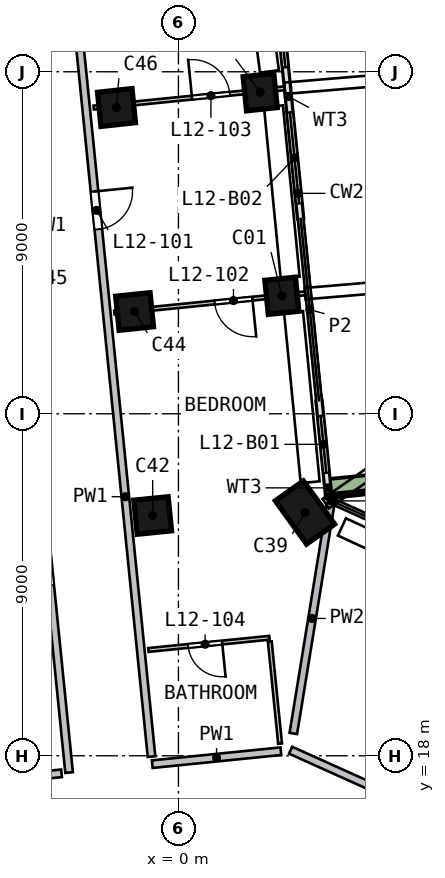
"""IFC4 building model, lengths in metres.
Left out: names, types, materials, properties, quantities, classifications, styles, units other than length and angle.
Written with IfcOpenShell. Run it as: python <this file> out.ifc"""

import sys

from ifc_helpers import new_model, si_unit, direction, frame, frame_2d, origin, origin_2d, place, context, subcontext, project, spatial, rectangle, extrude, element, fill, save


model = new_model("IFC4")
c1 = context("Model", 3, precision=1e-05, world=origin(), true_north=direction((0.0, 1.0)))
c2 = subcontext(c1, "Body", "Model", "MODEL_VIEW")
j1 = project(units=[si_unit("LENGTHUNIT", "METRE"), si_unit("PLANEANGLEUNIT", "RADIAN")], contexts=[c1])
p1 = place(None, origin())
s1 = spatial("IfcSite", under=j1, at=p1, CompositionType="ELEMENT")
p2 = place(p1, origin())
s2 = spatial("IfcBuilding", under=s1, at=p2, CompositionType="ELEMENT")
p3 = place(p2, frame((0.0, 0.0, 56.5)))
s3 = spatial("IfcBuildingStorey", under=s2, at=p3, CompositionType="ELEMENT", Elevation=56.5)
p4 = place(p3, frame((2.891, 30.124, 0.0), z_axis=(-0.139578196, -0.016064374, 0.990080736), x_axis=(-0.100870141, 0.994897743, 0.001922204)))
e1 = element("IfcColumn", 1, at=p4, inside=s3, PredefinedType="COLUMN", context=c2, shape_type="SweptSolid", body=[
    extrude(rectangle(XDim=0.9, YDim=0.8, at=origin_2d()), origin(), (0.0, 0.0, 1.0), 3.222),
])
p5 = place(p3, frame((2.347, 35.521, 0.0), z_axis=(-0.161009638, -0.047156056, 0.985825645), x_axis=(-0.105437121, 0.993963489, 0.03032484)))
e2 = element("IfcColumn", 2, at=p5, inside=s3, PredefinedType="COLUMN", context=c2, shape_type="SweptSolid", body=[
    extrude(rectangle(XDim=0.9, YDim=0.8, at=origin_2d()), origin(), (0.0, 0.0, 1.0), 3.236),
])
p6 = place(p3, frame((3.47, 24.383, 0.0), z_axis=(-0.116064233, 0.015505634, 0.993120672), x_axis=(0.577080719, -0.812746414, 0.080131833)))
e3 = element("IfcColumn", 3, at=p6, inside=s3, PredefinedType="COLUMN", context=c2, shape_type="SweptSolid", body=[
    extrude(rectangle(XDim=1.4, YDim=0.9, at=origin_2d()), origin(), (0.0, 0.0, 1.0), 3.212),
])
p7 = place(p3, frame((-0.538, 24.327, 0.0), z_axis=(-0.115627488, -0.003496952, 0.993286492), x_axis=(-0.099182883, 0.995036719, -0.008042666)))
e4 = element("IfcColumn", 4, at=p7, inside=s3, PredefinedType="COLUMN", context=c2, shape_type="SweptSolid", body=[
    extrude(rectangle(XDim=0.9, YDim=0.9, at=origin_2d()), origin(), (0.0, 0.0, 1.0), 3.211),
])
p8 = place(p3, frame((-0.987, 29.733, 0.0), z_axis=(-0.137507975, -0.034320172, 0.989905896), x_axis=(-0.102729911, 0.99450397, 0.020209361)))
e5 = element("IfcColumn", 5, at=p8, inside=s3, PredefinedType="COLUMN", context=c2, shape_type="SweptSolid", body=[
    extrude(rectangle(XDim=0.9, YDim=0.9, at=origin_2d()), origin(), (0.0, 0.0, 1.0), 3.222),
])
p9 = place(p3, frame((-1.436, 35.139, 0.0), z_axis=(-0.158938447, -0.064992857, 0.985146943), x_axis=(-0.108561038, 0.992930661, 0.047991701)))
e6 = element("IfcColumn", 6, at=p9, inside=s3, PredefinedType="COLUMN", context=c2, shape_type="SweptSolid", body=[
    extrude(rectangle(XDim=0.9, YDim=0.9, at=origin_2d()), origin(), (0.0, 0.0, 1.0), 3.238),
])
p10 = place(p3, frame((3.951, 24.85, 0.0), z_axis=(0.0, 0.0, 1.0), x_axis=(-0.100315267, 0.994955701, 0.0)))
e7 = element("IfcWall", 7, at=p10, inside=s3, PredefinedType="SOLIDWALL", context=c2, shape_type="SweptSolid", body=[
    extrude(rectangle(XDim=2.502, YDim=0.15, at=frame_2d((1.251, 0.0))), origin(), (0.0, 0.0, 1.0), 2.425),
])
p11 = place(p10, frame((0.602, 0.0, 0.0)))
e8 = element("IfcOpeningElement", 8, at=p11, cuts=e7, PredefinedType="OPENING", context=c2, shape_type="SweptSolid", body=[
    extrude(rectangle(XDim=1.5, YDim=2.4, at=frame_2d((0.75, 1.2))), frame((0.0, 0.085, 0.0), z_axis=(0.0, -1.0, 0.0), x_axis=(1.0, 0.0, 0.0)), (0.0, 0.0, 1.0), 0.17),
])
p12 = place(p3, frame((3.216, 32.141, 0.0), z_axis=(0.0, 0.0, 1.0), x_axis=(-0.100358585, 0.994951333, 0.0)))
e9 = element("IfcWall", 9, at=p12, inside=s3, PredefinedType="SOLIDWALL", context=c2, shape_type="SweptSolid", body=[
    extrude(rectangle(XDim=3.449, YDim=0.15, at=frame_2d((1.725, 0.0))), origin(), (0.0, 0.0, 1.0), 2.425),
])
p13 = place(p12, frame((0.4, 0.0, 0.0)))
e10 = element("IfcOpeningElement", 10, at=p13, cuts=e9, PredefinedType="OPENING", context=c2, shape_type="SweptSolid", body=[
    extrude(rectangle(XDim=2.4, YDim=2.4, at=frame_2d((1.2, 1.2))), frame((0.0, 0.085, 0.0), z_axis=(0.0, -1.0, 0.0), x_axis=(1.0, 0.0, 0.0)), (0.0, 0.0, 1.0), 0.17),
])
p14 = place(p3, frame((2.869, 35.573, 0.0), z_axis=(0.0, 0.0, 1.0), x_axis=(-0.100352227, 0.994951974, 0.0)))
e11 = element("IfcWall", 11, at=p14, inside=s3, PredefinedType="SOLIDWALL", context=c2, shape_type="SweptSolid", body=[
    extrude(rectangle(XDim=2.45, YDim=0.15, at=frame_2d((1.225, 0.0))), origin(), (0.0, 0.0, 1.0), 2.425),
])
p15 = place(p14, frame((0.55, 0.0, 0.0)))
e12 = element("IfcOpeningElement", 12, at=p15, cuts=e11, PredefinedType="OPENING", context=c2, shape_type="SweptSolid", body=[
    extrude(rectangle(XDim=1.5, YDim=2.4, at=frame_2d((0.75, 1.2))), frame((0.0, 0.085, 0.0), z_axis=(0.0, -1.0, 0.0), x_axis=(1.0, 0.0, 0.0)), (0.0, 0.0, 1.0), 0.17),
])
p16 = place(p3, frame((4.009, 25.037, 0.0), z_axis=(0.0, 0.0, 1.0), x_axis=(0.994951439, 0.100357532, 0.0)))
e13 = element("IfcWall", 13, at=p16, inside=s3, PredefinedType="SOLIDWALL", context=c2, shape_type="SweptSolid", body=[
    extrude(rectangle(XDim=3.199, YDim=0.5, at=frame_2d((1.6, 0.0))), origin(), (0.0, 0.0, 1.0), 0.7),
])
p17 = place(p3, frame((-3.076, 17.538, 0.0), z_axis=(0.0, 0.0, 1.0), x_axis=(-0.994955781, -0.100314472, 0.0)))
e14 = element("IfcWall", 14, at=p17, inside=s3, PredefinedType="SOLIDWALL", context=c2, shape_type="SweptSolid", body=[
    extrude(rectangle(XDim=3.458, YDim=0.2, at=frame_2d((1.729, 0.0))), origin(), (0.0, 0.0, 1.0), 3.19),
])
p18 = place(p3, frame((-2.877, 17.558, 0.0), z_axis=(0.0, 0.0, 1.0), x_axis=(-0.100365662, 0.994950619, 0.0)))
e15 = element("IfcWall", 15, at=p18, inside=s3, PredefinedType="SOLIDWALL", context=c2, shape_type="SweptSolid", body=[
    extrude(rectangle(XDim=22.771, YDim=0.2, at=frame_2d((11.385, 0.0))), origin(), (0.0, 0.0, 1.0), 3.19),
])
p19 = place(p18, frame((4.95, 0.0, 0.0)))
e16 = element("IfcOpeningElement", 16, at=p19, cuts=e15, PredefinedType="OPENING", context=c2, shape_type="SweptSolid", body=[
    extrude(rectangle(XDim=1.0, YDim=2.1, at=frame_2d((0.5, 1.05))), frame((0.0, 0.11, 0.0), z_axis=(0.0, -1.0, 0.0), x_axis=(1.0, 0.0, 0.0)), (0.0, 0.0, 1.0), 0.22),
])
p20 = place(p3, frame((-2.973, 40.435, 0.0), z_axis=(0.0, 0.0, 1.0), x_axis=(0.100357237, -0.994951469, 0.0)))
e17 = element("IfcWall", 17, at=p20, inside=s3, PredefinedType="SOLIDWALL", context=c2, shape_type="SweptSolid", body=[
    extrude(rectangle(XDim=22.571, YDim=0.2, at=frame_2d((11.285, 0.0))), origin(), (0.0, 0.0, 1.0), 3.19),
])
p21 = place(p20, frame((7.624, 0.0, 0.0)))
e18 = element("IfcOpeningElement", 18, at=p21, cuts=e17, PredefinedType="OPENING", context=c2, shape_type="SweptSolid", body=[
    extrude(rectangle(XDim=1.0, YDim=2.1, at=frame_2d((0.5, 1.05))), frame((0.0, 0.11, 0.0), z_axis=(0.0, -1.0, 0.0), x_axis=(1.0, 0.0, 0.0)), (0.0, 0.0, 1.0), 0.22),
])
p22 = place(p3, frame((2.695, 18.12, 0.0), z_axis=(0.0, 0.0, 1.0), x_axis=(-0.994948641, -0.100385263, 0.0)))
e19 = element("IfcWall", 19, at=p22, inside=s3, PredefinedType="SOLIDWALL", context=c2, shape_type="SweptSolid", body=[
    extrude(rectangle(XDim=3.4, YDim=0.2, at=frame_2d((1.7, 0.0))), origin(), (0.0, 0.0, 1.0), 3.19),
])
p23 = place(p3, frame((11.629, 14.239, 0.0), z_axis=(0.0, 0.0, 1.0), x_axis=(-0.911829794, 0.410568419, 0.0)))
e20 = element("IfcWall", 20, at=p23, inside=s3, PredefinedType="SOLIDWALL", context=c2, shape_type="SweptSolid", body=[
    extrude(rectangle(XDim=9.516, YDim=0.2, at=frame_2d((4.758, 0.0))), origin(), (0.0, 0.0, 1.0), 3.19),
])
p24 = place(p3, frame((4.009, 24.64, 0.0), z_axis=(0.0, 0.0, 1.0), x_axis=(-0.160569165, -0.987024591, 0.0)))
e21 = element("IfcWall", 21, at=p24, inside=s3, PredefinedType="SOLIDWALL", context=c2, shape_type="SweptSolid", body=[
    extrude(rectangle(XDim=6.132, YDim=0.2, at=frame_2d((3.066, 0.0))), origin(), (0.0, 0.0, 1.0), 3.19),
])
p25 = place(p3, frame((-2.23, 35.059, 0.0), z_axis=(0.0, 0.0, 1.0), x_axis=(0.994950657, 0.100365285, 0.0)))
e22 = element("IfcWall", 22, at=p25, inside=s3, PredefinedType="PARTITIONING", context=c2, shape_type="SweptSolid", body=[
    extrude(rectangle(XDim=5.05, YDim=0.1, at=frame_2d((2.525, 0.0))), origin(), (0.0, 0.0, 1.0), 3.19),
])
p26 = place(p25, frame((2.6, 0.0, 0.0)))
e23 = element("IfcOpeningElement", 23, at=p26, cuts=e22, PredefinedType="OPENING", context=c2, shape_type="SweptSolid", body=[
    extrude(rectangle(XDim=1.0, YDim=2.1, at=frame_2d((0.5, 1.05))), frame((0.0, 0.06, 0.0), z_axis=(0.0, -1.0, 0.0), x_axis=(1.0, 0.0, 0.0)), (0.0, 0.0, 1.0), 0.12),
])
p27 = place(p3, frame((2.394, 21.105, 0.0), z_axis=(0.0, 0.0, 1.0), x_axis=(-0.994953744, -0.100334676, 0.0)))
e24 = element("IfcWall", 24, at=p27, inside=s3, PredefinedType="PARTITIONING", context=c2, shape_type="SweptSolid", body=[
    extrude(rectangle(XDim=3.2, YDim=0.1, at=frame_2d((1.6, 0.0))), origin(), (0.0, 0.0, 1.0), 3.19),
])
p28 = place(p27, frame((1.25, 0.0, 0.0)))
e25 = element("IfcOpeningElement", 25, at=p28, cuts=e24, PredefinedType="OPENING", context=c2, shape_type="SweptSolid", body=[
    extrude(rectangle(XDim=0.9, YDim=2.1, at=frame_2d((0.45, 1.05))), frame((0.0, 0.06, 0.0), z_axis=(0.0, -1.0, 0.0), x_axis=(1.0, 0.0, 0.0)), (0.0, 0.0, 1.0), 0.12),
])
p29 = place(p3, frame((3.339, 30.169, 0.0), z_axis=(0.0, 0.0, 1.0), x_axis=(-0.994951144, -0.100360457, 0.0)))
e26 = element("IfcWall", 26, at=p29, inside=s3, PredefinedType="PARTITIONING", context=c2, shape_type="SweptSolid", body=[
    extrude(rectangle(XDim=5.05, YDim=0.1, at=frame_2d((2.525, 0.0))), origin(), (0.0, 0.0, 1.0), 3.19),
])
p30 = place(p29, frame((1.4, 0.0, 0.0)))
e27 = element("IfcOpeningElement", 27, at=p30, cuts=e26, PredefinedType="OPENING", context=c2, shape_type="SweptSolid", body=[
    extrude(rectangle(XDim=1.0, YDim=2.1, at=frame_2d((0.5, 1.05))), frame((0.0, 0.06, 0.0), z_axis=(0.0, -1.0, 0.0), x_axis=(1.0, 0.0, 0.0)), (0.0, 0.0, 1.0), 0.12),
])
p31 = place(p3, frame((2.675, 18.319, 0.0), z_axis=(0.0, 0.0, 1.0), x_axis=(-0.100372122, 0.994949967, 0.0)))
e28 = element("IfcWall", 28, at=p31, inside=s3, PredefinedType="PARTITIONING", context=c2, shape_type="SweptSolid", body=[
    extrude(rectangle(XDim=2.7, YDim=0.1, at=frame_2d((1.35, 0.0))), origin(), (0.0, 0.0, 1.0), 3.19),
])
p32 = place(p11, origin())
e29 = element("IfcDoor", 29, at=p32, inside=s3, OperationType="SLIDING_TO_LEFT", PredefinedType="DOOR", context=c2, shape_type="SweptSolid", body=[
    extrude(rectangle(XDim=1.5, YDim=2.4, at=frame_2d((0.75, 1.2))), frame((0.0, 0.025, 0.0), z_axis=(0.0, -1.0, 0.0), x_axis=(1.0, 0.0, 0.0)), (0.0, 0.0, 1.0), 0.05),
])
fill(e8, e29)
p33 = place(p13, origin())
e30 = element("IfcDoor", 30, at=p33, inside=s3, OperationType="SLIDING_TO_RIGHT", PredefinedType="DOOR", context=c2, shape_type="SweptSolid", body=[
    extrude(rectangle(XDim=2.4, YDim=2.4, at=frame_2d((1.2, 1.2))), frame((0.0, 0.025, 0.0), z_axis=(0.0, -1.0, 0.0), x_axis=(1.0, 0.0, 0.0)), (0.0, 0.0, 1.0), 0.05),
])
fill(e10, e30)
p34 = place(p15, origin())
e31 = element("IfcDoor", 31, at=p34, inside=s3, OperationType="SLIDING_TO_LEFT", PredefinedType="DOOR", context=c2, shape_type="SweptSolid", body=[
    extrude(rectangle(XDim=1.5, YDim=2.4, at=frame_2d((0.75, 1.2))), frame((0.0, 0.025, 0.0), z_axis=(0.0, -1.0, 0.0), x_axis=(1.0, 0.0, 0.0)), (0.0, 0.0, 1.0), 0.05),
])
fill(e12, e31)
p35 = place(p21, origin())
e32 = element("IfcDoor", 32, at=p35, inside=s3, OperationType="SINGLE_SWING_LEFT", PredefinedType="DOOR", context=c2, shape_type="SweptSolid", body=[
    extrude(rectangle(XDim=1.0, YDim=2.1, at=frame_2d((0.5, 1.05))), frame((0.0, 0.025, 0.0), z_axis=(0.0, -1.0, 0.0), x_axis=(1.0, 0.0, 0.0)), (0.0, 0.0, 1.0), 0.05),
])
fill(e18, e32)
p36 = place(p30, origin())
e33 = element("IfcDoor", 33, at=p36, inside=s3, OperationType="SINGLE_SWING_LEFT", PredefinedType="DOOR", context=c2, shape_type="SweptSolid", body=[
    extrude(rectangle(XDim=1.0, YDim=2.1, at=frame_2d((0.5, 1.05))), frame((0.0, 0.025, 0.0), z_axis=(0.0, -1.0, 0.0), x_axis=(1.0, 0.0, 0.0)), (0.0, 0.0, 1.0), 0.05),
])
fill(e27, e33)
p37 = place(p26, origin())
e34 = element("IfcDoor", 34, at=p37, inside=s3, OperationType="SINGLE_SWING_LEFT", PredefinedType="DOOR", context=c2, shape_type="SweptSolid", body=[
    extrude(rectangle(XDim=1.0, YDim=2.1, at=frame_2d((0.5, 1.05))), frame((0.0, 0.025, 0.0), z_axis=(0.0, -1.0, 0.0), x_axis=(1.0, 0.0, 0.0)), (0.0, 0.0, 1.0), 0.05),
])
fill(e23, e34)
p38 = place(p28, origin())
e35 = element("IfcDoor", 35, at=p38, inside=s3, OperationType="SINGLE_SWING_LEFT", PredefinedType="DOOR", context=c2, shape_type="SweptSolid", body=[
    extrude(rectangle(XDim=0.9, YDim=2.1, at=frame_2d((0.45, 1.05))), frame((0.0, 0.025, 0.0), z_axis=(0.0, -1.0, 0.0), x_axis=(1.0, 0.0, 0.0)), (0.0, 0.0, 1.0), 0.05),
])
fill(e25, e35)
save(model, sys.argv[1])
